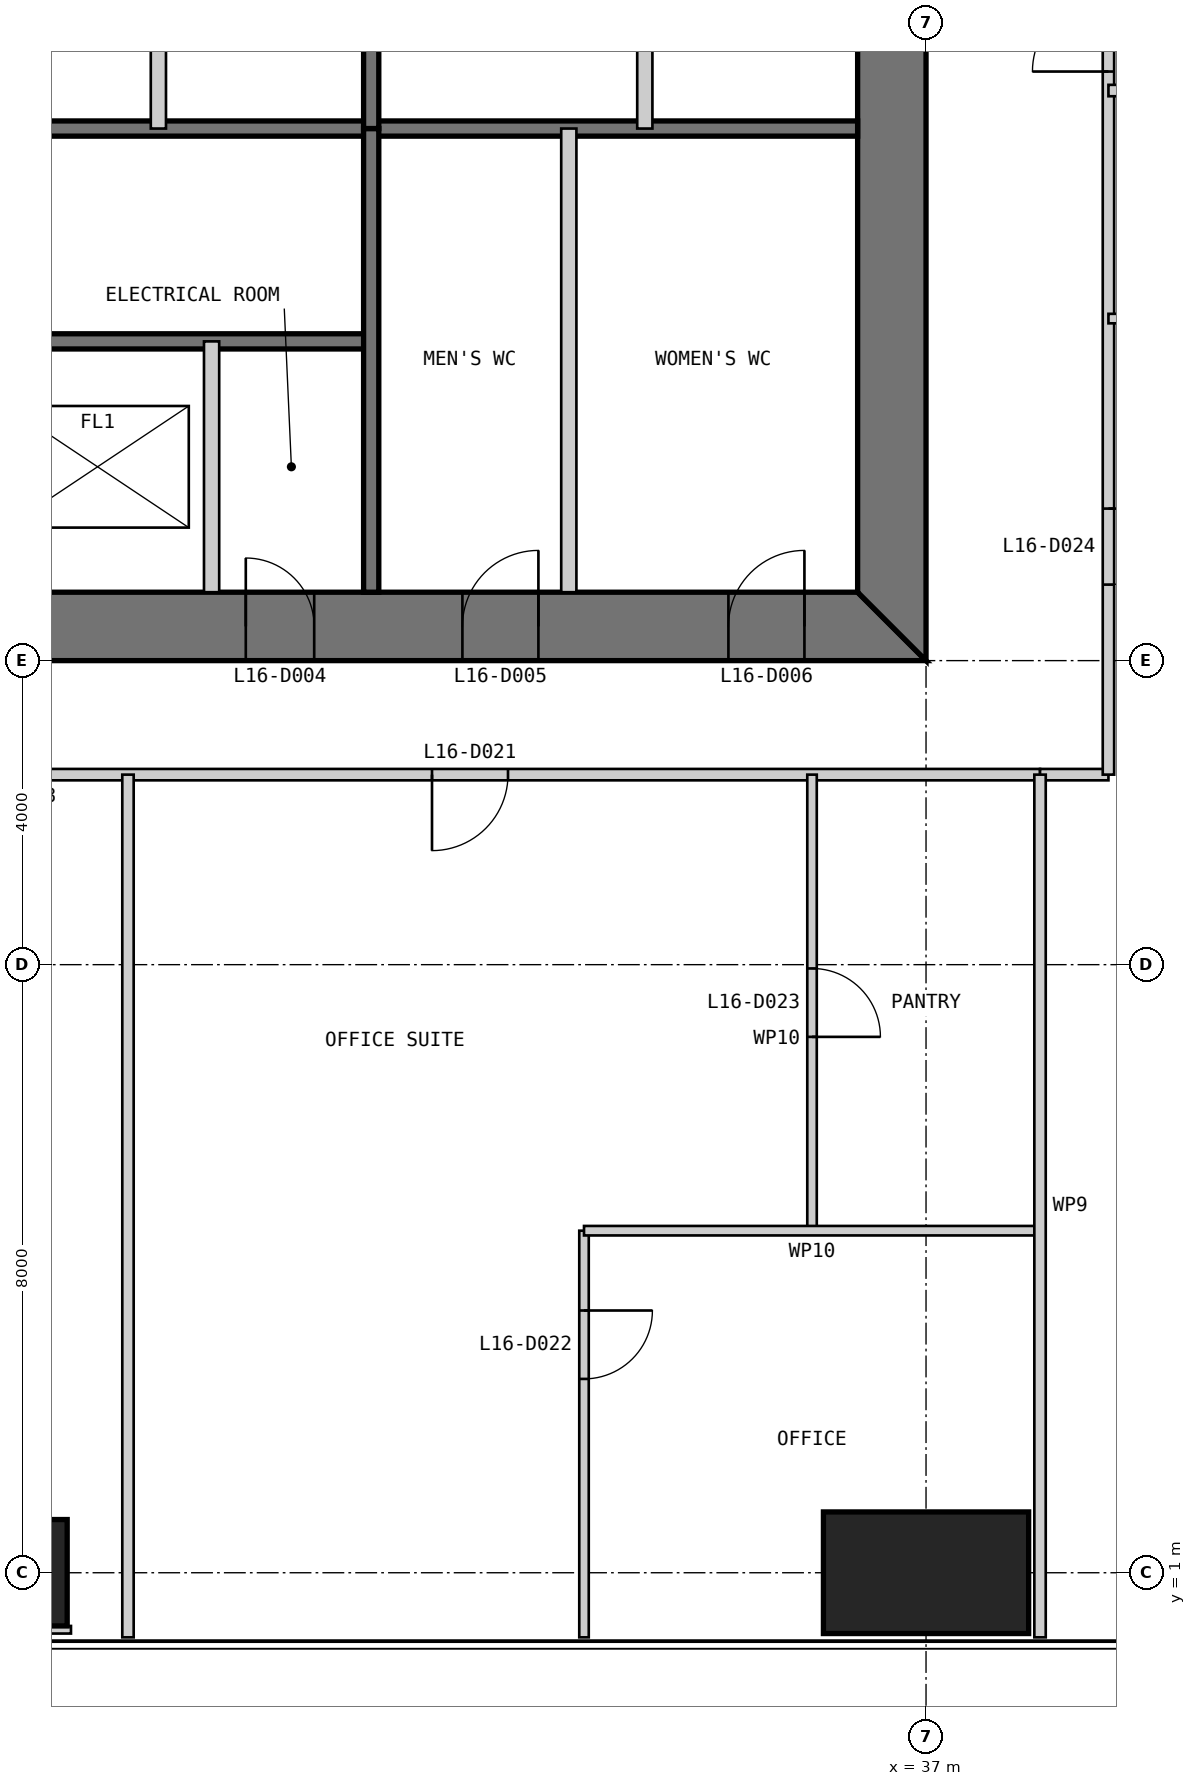
"""IFC4 building model, lengths in metres.
Left out: names, types, materials, properties, quantities, classifications, styles, units other than length and angle.
Written with IfcOpenShell. Run it as: python <this file> out.ifc"""

import sys

from ifc_helpers import new_model, si_unit, direction, frame, frame_2d, origin, origin_2d, place, context, subcontext, project, spatial, polyline, rectangle, outline, extrude, element, fill, save


model = new_model("IFC4")
c1 = context("Model", 3, precision=1e-05, world=origin(), true_north=direction((0.0, 1.0)))
c2 = subcontext(c1, "Body", "Model", "MODEL_VIEW")
j1 = project(units=[si_unit("LENGTHUNIT", "METRE"), si_unit("PLANEANGLEUNIT", "RADIAN")], contexts=[c1])
p1 = place(None, origin())
s1 = spatial("IfcSite", under=j1, at=p1, CompositionType="ELEMENT")
p2 = place(p1, origin())
s2 = spatial("IfcBuilding", under=s1, at=p2, CompositionType="ELEMENT")
p3 = place(p2, frame((0.0, 0.0, 71.0)))
s3 = spatial("IfcBuildingStorey", under=s2, at=p3, CompositionType="ELEMENT", Elevation=71.0)
p4 = place(p3, frame((25.0, 1.0, 0.0), z_axis=(0.0, 0.0, 1.0), x_axis=(1.0, 0.0, 0.0)))
e1 = element("IfcColumn", 1, at=p4, inside=s3, PredefinedType="COLUMN", context=c2, shape_type="SweptSolid", body=[
    extrude(rectangle(XDim=1.4, YDim=1.4, at=origin_2d()), origin(), (0.0, 0.0, 1.0), 4.0),
])
p5 = place(p3, frame((37.0, 1.0, 0.0), z_axis=(0.0, 0.0, 1.0), x_axis=(1.0, 0.0, 0.0)))
e2 = element("IfcColumn", 2, at=p5, inside=s3, PredefinedType="COLUMN", context=c2, shape_type="SweptSolid", body=[
    extrude(rectangle(XDim=2.7, YDim=1.6, at=origin_2d()), origin(), (0.0, 0.0, 1.0), 4.0),
])
p6 = place(p3, frame((13.0, 13.45, 0.0), z_axis=(0.0, 0.0, 1.0), x_axis=(1.0, 0.0, 0.0)))
e3 = element("IfcWall", 3, at=p6, inside=s3, PredefinedType="SHEAR", context=c2, shape_type="SweptSolid", body=[
    extrude(outline(polyline([(0.0, -0.45), (24.0, -0.45), (23.1, 0.45), (0.9, 0.45), (0.0, -0.45)])), origin(), (0.0, 0.0, 1.0), 4.0),
])
p7 = place(p6, frame((4.9, 0.0, 0.0)))
e4 = element("IfcOpeningElement", 4, at=p7, cuts=e3, PredefinedType="OPENING", context=c2, shape_type="SweptSolid", body=[
    extrude(rectangle(XDim=1.0, YDim=2.2, at=frame_2d((0.5, 1.1))), frame((0.0, 0.46, 0.0), z_axis=(0.0, -1.0, 0.0), x_axis=(1.0, 0.0, 0.0)), (0.0, 0.0, 1.0), 0.92),
])
p8 = place(p6, frame((8.9, 0.0, 0.0)))
e5 = element("IfcOpeningElement", 5, at=p8, cuts=e3, PredefinedType="OPENING", context=c2, shape_type="SweptSolid", body=[
    extrude(rectangle(XDim=1.1, YDim=2.2, at=frame_2d((0.55, 1.1))), frame((0.0, 0.46, 0.0), z_axis=(0.0, -1.0, 0.0), x_axis=(1.0, 0.0, 0.0)), (0.0, 0.0, 1.0), 0.92),
])
p9 = place(p6, frame((15.05, 0.0, 0.0)))
e6 = element("IfcOpeningElement", 6, at=p9, cuts=e3, PredefinedType="OPENING", context=c2, shape_type="SweptSolid", body=[
    extrude(rectangle(XDim=0.9, YDim=2.2, at=frame_2d((0.45, 1.1))), frame((0.0, 0.46, 0.0), z_axis=(0.0, -1.0, 0.0), x_axis=(1.0, 0.0, 0.0)), (0.0, 0.0, 1.0), 0.92),
])
p10 = place(p6, frame((17.9, 0.0, 0.0)))
e7 = element("IfcOpeningElement", 7, at=p10, cuts=e3, PredefinedType="OPENING", context=c2, shape_type="SweptSolid", body=[
    extrude(rectangle(XDim=1.0, YDim=2.2, at=frame_2d((0.5, 1.1))), frame((0.0, 0.46, 0.0), z_axis=(0.0, -1.0, 0.0), x_axis=(1.0, 0.0, 0.0)), (0.0, 0.0, 1.0), 0.92),
])
p11 = place(p6, frame((21.4, 0.0, 0.0)))
e8 = element("IfcOpeningElement", 8, at=p11, cuts=e3, PredefinedType="OPENING", context=c2, shape_type="SweptSolid", body=[
    extrude(rectangle(XDim=1.0, YDim=2.2, at=frame_2d((0.5, 1.1))), frame((0.0, 0.46, 0.0), z_axis=(0.0, -1.0, 0.0), x_axis=(1.0, 0.0, 0.0)), (0.0, 0.0, 1.0), 0.92),
])
p12 = place(p3, frame((36.55, 13.9, 0.0), z_axis=(0.0, 0.0, 1.0), x_axis=(0.0, 1.0, 0.0)))
e9 = element("IfcWall", 9, at=p12, inside=s3, PredefinedType="SHEAR", context=c2, shape_type="SweptSolid", body=[
    extrude(outline(polyline([(-0.9, -0.45), (23.1, -0.45), (22.2, 0.45), (0.0, 0.45), (-0.9, -0.45)])), origin(), (0.0, 0.0, 1.0), 4.0),
])
p13 = place(p12, frame((20.2, 0.0, 0.0)))
e10 = element("IfcOpeningElement", 10, at=p13, cuts=e9, PredefinedType="OPENING", context=c2, shape_type="SweptSolid", body=[
    extrude(rectangle(XDim=1.0, YDim=2.2, at=frame_2d((0.5, 1.1))), frame((0.0, 0.46, 0.0), z_axis=(0.0, -1.0, 0.0), x_axis=(1.0, 0.0, 0.0)), (0.0, 0.0, 1.0), 0.92),
])
p14 = place(p12, frame((17.25, 0.0, 0.0)))
e11 = element("IfcOpeningElement", 11, at=p14, cuts=e9, PredefinedType="OPENING", context=c2, shape_type="SweptSolid", body=[
    extrude(rectangle(XDim=0.9, YDim=2.2, at=frame_2d((0.45, 1.1))), frame((0.0, 0.46, 0.0), z_axis=(0.0, -1.0, 0.0), x_axis=(1.0, 0.0, 0.0)), (0.0, 0.0, 1.0), 0.92),
])
p15 = place(p3, frame((20.3, 17.2, 0.0), z_axis=(0.0, 0.0, 1.0), x_axis=(1.0, 0.0, 0.0)))
e12 = element("IfcWall", 12, at=p15, inside=s3, PredefinedType="SOLIDWALL", context=c2, shape_type="SweptSolid", body=[
    extrude(rectangle(XDim=9.4, YDim=0.2, at=frame_2d((4.7, 0.0))), origin(), (0.0, 0.0, 1.0), 3.8),
])
p16 = place(p15, frame((0.25, 0.0, 0.0)))
e13 = element("IfcOpeningElement", 13, at=p16, cuts=e12, PredefinedType="OPENING", context=c2, shape_type="SweptSolid", body=[
    extrude(rectangle(XDim=1.0, YDim=2.2, at=frame_2d((0.5, 1.1))), frame((0.0, 0.11, 0.0), z_axis=(0.0, -1.0, 0.0), x_axis=(1.0, 0.0, 0.0)), (0.0, 0.0, 1.0), 0.22),
])
p17 = place(p3, frame((20.3, 20.0, 0.0), z_axis=(0.0, 0.0, 1.0), x_axis=(1.0, 0.0, 0.0)))
e14 = element("IfcWall", 14, at=p17, inside=s3, PredefinedType="SOLIDWALL", context=c2, shape_type="SweptSolid", body=[
    extrude(rectangle(XDim=15.8, YDim=0.2, at=frame_2d((7.9, 0.0))), origin(), (0.0, 0.0, 1.0), 3.8),
])
p18 = place(p3, frame((27.6, 13.9, 0.0), z_axis=(0.0, 0.0, 1.0), x_axis=(0.0, 1.0, 0.0)))
e15 = element("IfcWall", 15, at=p18, inside=s3, PredefinedType="PARTITIONING", context=c2, shape_type="SweptSolid", body=[
    extrude(rectangle(XDim=3.3, YDim=0.2, at=frame_2d((1.65, 0.0))), origin(), (0.0, 0.0, 1.0), 3.8),
])
p19 = place(p3, frame((29.7, 13.9, 0.0), z_axis=(0.0, 0.0, 1.0), x_axis=(0.0, 1.0, 0.0)))
e16 = element("IfcWall", 16, at=p19, inside=s3, PredefinedType="SOLIDWALL", context=c2, shape_type="SweptSolid", body=[
    extrude(rectangle(XDim=6.1, YDim=0.2, at=frame_2d((3.05, 0.0))), origin(), (0.0, 0.0, 1.0), 3.8),
])
p20 = place(p3, frame((32.3, 13.9, 0.0), z_axis=(0.0, 0.0, 1.0), x_axis=(0.0, 1.0, 0.0)))
e17 = element("IfcWall", 17, at=p20, inside=s3, PredefinedType="PARTITIONING", context=c2, shape_type="SweptSolid", body=[
    extrude(rectangle(XDim=6.1, YDim=0.2, at=frame_2d((3.05, 0.0))), origin(), (0.0, 0.0, 1.0), 3.8),
])
p21 = place(p3, frame((33.3, 36.1, 0.0), z_axis=(0.0, 0.0, 1.0), x_axis=(0.0, -1.0, 0.0)))
e18 = element("IfcWall", 18, at=p21, inside=s3, PredefinedType="PARTITIONING", context=c2, shape_type="SweptSolid", body=[
    extrude(rectangle(XDim=16.1, YDim=0.2, at=frame_2d((8.05, 0.0))), origin(), (0.0, 0.0, 1.0), 3.8),
])
p22 = place(p21, frame((4.1, 0.0, 0.0)))
e19 = element("IfcOpeningElement", 19, at=p22, cuts=e18, PredefinedType="OPENING", context=c2, shape_type="SweptSolid", body=[
    extrude(rectangle(XDim=0.9, YDim=2.2, at=frame_2d((0.45, 1.1))), frame((0.0, 0.11, 0.0), z_axis=(0.0, -1.0, 0.0), x_axis=(1.0, 0.0, 0.0)), (0.0, 0.0, 1.0), 0.22),
])
p23 = place(p3, frame((29.7, 36.1, 0.0), z_axis=(0.0, 0.0, 1.0), x_axis=(0.0, -1.0, 0.0)))
e20 = element("IfcWall", 20, at=p23, inside=s3, PredefinedType="SOLIDWALL", context=c2, shape_type="SweptSolid", body=[
    extrude(rectangle(XDim=16.1, YDim=0.2, at=frame_2d((8.05, 0.0))), origin(), (0.0, 0.0, 1.0), 3.8),
])
p24 = place(p3, frame((26.9, 30.0, 0.0), z_axis=(0.0, 0.0, 1.0), x_axis=(0.0, -1.0, 0.0)))
e21 = element("IfcWall", 21, at=p24, inside=s3, PredefinedType="PARTITIONING", context=c2, shape_type="SweptSolid", body=[
    extrude(rectangle(XDim=10.0, YDim=0.2, at=frame_2d((5.0, 0.0))), origin(), (0.0, 0.0, 1.0), 3.8),
])
p25 = place(p3, frame((11.5, 11.5, 0.0), z_axis=(0.0, 0.0, 1.0), x_axis=(1.0, 0.0, 0.0)))
e22 = element("IfcWall", 22, at=p25, inside=s3, PredefinedType="PARTITIONING", context=c2, shape_type="SweptSolid", body=[
    extrude(rectangle(XDim=27.0, YDim=0.15, at=frame_2d((13.5, 0.0))), origin(), (0.0, 0.0, 1.0), 3.85),
])
p26 = place(p25, frame((1.0, 0.0, 0.0)))
e23 = element("IfcOpeningElement", 23, at=p26, cuts=e22, PredefinedType="OPENING", context=c2, shape_type="SweptSolid", body=[
    extrude(rectangle(XDim=1.0, YDim=2.2, at=frame_2d((0.5, 1.1))), frame((0.0, 0.085, 0.0), z_axis=(0.0, -1.0, 0.0), x_axis=(1.0, 0.0, 0.0)), (0.0, 0.0, 1.0), 0.17),
])
p27 = place(p25, frame((5.5, 0.0, 0.0)))
e24 = element("IfcOpeningElement", 24, at=p27, cuts=e22, PredefinedType="OPENING", context=c2, shape_type="SweptSolid", body=[
    extrude(rectangle(XDim=1.0, YDim=2.2, at=frame_2d((0.5, 1.1))), frame((0.0, 0.085, 0.0), z_axis=(0.0, -1.0, 0.0), x_axis=(1.0, 0.0, 0.0)), (0.0, 0.0, 1.0), 0.17),
])
p28 = place(p25, frame((11.5, 0.0, 0.0)))
e25 = element("IfcOpeningElement", 25, at=p28, cuts=e22, PredefinedType="OPENING", context=c2, shape_type="SweptSolid", body=[
    extrude(rectangle(XDim=1.0, YDim=2.2, at=frame_2d((0.5, 1.1))), frame((0.0, 0.085, 0.0), z_axis=(0.0, -1.0, 0.0), x_axis=(1.0, 0.0, 0.0)), (0.0, 0.0, 1.0), 0.17),
])
p29 = place(p25, frame((19.0, 0.0, 0.0)))
e26 = element("IfcOpeningElement", 26, at=p29, cuts=e22, PredefinedType="OPENING", context=c2, shape_type="SweptSolid", body=[
    extrude(rectangle(XDim=1.0, YDim=2.2, at=frame_2d((0.5, 1.1))), frame((0.0, 0.085, 0.0), z_axis=(0.0, -1.0, 0.0), x_axis=(1.0, 0.0, 0.0)), (0.0, 0.0, 1.0), 0.17),
])
p30 = place(p3, frame((26.5, 0.15, 0.0), z_axis=(0.0, 0.0, 1.0), x_axis=(0.0, 1.0, 0.0)))
e27 = element("IfcWall", 27, at=p30, inside=s3, PredefinedType="PARTITIONING", context=c2, shape_type="SweptSolid", body=[
    extrude(rectangle(XDim=11.35, YDim=0.15, at=frame_2d((5.675, 0.0))), origin(), (0.0, 0.0, 1.0), 3.85),
])
p31 = place(p3, frame((32.5, 0.15, 0.0), z_axis=(0.0, 0.0, 1.0), x_axis=(0.0, 1.0, 0.0)))
e28 = element("IfcWall", 28, at=p31, inside=s3, PredefinedType="PARTITIONING", context=c2, shape_type="SweptSolid", body=[
    extrude(rectangle(XDim=5.35, YDim=0.125, at=frame_2d((2.675, 0.0))), origin(), (0.0, 0.0, 1.0), 3.85),
])
p32 = place(p31, frame((3.4, 0.0, 0.0)))
e29 = element("IfcOpeningElement", 29, at=p32, cuts=e28, PredefinedType="OPENING", context=c2, shape_type="SweptSolid", body=[
    extrude(rectangle(XDim=0.9, YDim=2.2, at=frame_2d((0.45, 1.1))), frame((0.0, 0.073, 0.0), z_axis=(0.0, -1.0, 0.0), x_axis=(1.0, 0.0, 0.0)), (0.0, 0.0, 1.0), 0.145),
])
p33 = place(p3, frame((35.5, 5.5, 0.0), z_axis=(0.0, 0.0, 1.0), x_axis=(0.0, 1.0, 0.0)))
e30 = element("IfcWall", 30, at=p33, inside=s3, PredefinedType="PARTITIONING", context=c2, shape_type="SweptSolid", body=[
    extrude(rectangle(XDim=6.0, YDim=0.125, at=frame_2d((3.0, 0.0))), origin(), (0.0, 0.0, 1.0), 3.85),
])
p34 = place(p33, frame((2.55, 0.0, 0.0)))
e31 = element("IfcOpeningElement", 31, at=p34, cuts=e30, PredefinedType="OPENING", context=c2, shape_type="SweptSolid", body=[
    extrude(rectangle(XDim=0.9, YDim=2.2, at=frame_2d((0.45, 1.1))), frame((0.0, 0.073, 0.0), z_axis=(0.0, -1.0, 0.0), x_axis=(1.0, 0.0, 0.0)), (0.0, 0.0, 1.0), 0.145),
])
p35 = place(p3, frame((32.5, 5.5, 0.0), z_axis=(0.0, 0.0, 1.0), x_axis=(1.0, 0.0, 0.0)))
e32 = element("IfcWall", 32, at=p35, inside=s3, PredefinedType="PARTITIONING", context=c2, shape_type="SweptSolid", body=[
    extrude(rectangle(XDim=6.0, YDim=0.125, at=frame_2d((3.0, 0.0))), origin(), (0.0, 0.0, 1.0), 3.85),
])
p36 = place(p3, frame((38.5, 11.5, 0.0), z_axis=(0.0, 0.0, 1.0), x_axis=(1.0, 0.0, 0.0)))
e33 = element("IfcWall", 33, at=p36, inside=s3, PredefinedType="PARTITIONING", context=c2, shape_type="SweptSolid", body=[
    extrude(rectangle(XDim=0.9, YDim=0.15, at=frame_2d((0.45, 0.0))), origin(), (0.0, 0.0, 1.0), 3.85),
])
p37 = place(p3, frame((39.4, 11.5, 0.0), z_axis=(0.0, 0.0, 1.0), x_axis=(0.0, 1.0, 0.0)))
e34 = element("IfcWall", 34, at=p37, inside=s3, PredefinedType="PARTITIONING", context=c2, shape_type="SweptSolid", body=[
    extrude(rectangle(XDim=27.9, YDim=0.15, at=frame_2d((13.95, 0.0))), origin(), (0.0, 0.0, 1.0), 3.85),
])
p38 = place(p37, frame((2.5, 0.0, 0.0)))
e35 = element("IfcOpeningElement", 35, at=p38, cuts=e34, PredefinedType="OPENING", context=c2, shape_type="SweptSolid", body=[
    extrude(rectangle(XDim=1.0, YDim=2.2, at=frame_2d((0.5, 1.1))), frame((0.0, 0.085, 0.0), z_axis=(0.0, -1.0, 0.0), x_axis=(1.0, 0.0, 0.0)), (0.0, 0.0, 1.0), 0.17),
])
p39 = place(p37, frame((9.25, 0.0, 0.0)))
e36 = element("IfcOpeningElement", 36, at=p39, cuts=e34, PredefinedType="OPENING", context=c2, shape_type="SweptSolid", body=[
    extrude(rectangle(XDim=1.0, YDim=2.2, at=frame_2d((0.5, 1.1))), frame((0.0, 0.085, 0.0), z_axis=(0.0, -1.0, 0.0), x_axis=(1.0, 0.0, 0.0)), (0.0, 0.0, 1.0), 0.17),
])
p40 = place(p37, frame((16.75, 0.0, 0.0)))
e37 = element("IfcOpeningElement", 37, at=p40, cuts=e34, PredefinedType="OPENING", context=c2, shape_type="SweptSolid", body=[
    extrude(rectangle(XDim=1.0, YDim=2.2, at=frame_2d((0.5, 1.1))), frame((0.0, 0.085, 0.0), z_axis=(0.0, -1.0, 0.0), x_axis=(1.0, 0.0, 0.0)), (0.0, 0.0, 1.0), 0.17),
])
p41 = place(p37, frame((23.5, 0.0, 0.0)))
e38 = element("IfcOpeningElement", 38, at=p41, cuts=e34, PredefinedType="OPENING", context=c2, shape_type="SweptSolid", body=[
    extrude(rectangle(XDim=1.0, YDim=2.2, at=frame_2d((0.5, 1.1))), frame((0.0, 0.085, 0.0), z_axis=(0.0, -1.0, 0.0), x_axis=(1.0, 0.0, 0.0)), (0.0, 0.0, 1.0), 0.17),
])
p42 = place(p3, frame((38.5, 0.15, 0.0), z_axis=(0.0, 0.0, 1.0), x_axis=(0.0, 1.0, 0.0)))
e39 = element("IfcWall", 39, at=p42, inside=s3, PredefinedType="PARTITIONING", context=c2, shape_type="SweptSolid", body=[
    extrude(rectangle(XDim=11.35, YDim=0.15, at=frame_2d((5.675, 0.0))), origin(), (0.0, 0.0, 1.0), 3.85),
])
p43 = place(p3, frame((44.5, 17.5, 0.0), z_axis=(0.0, 0.0, 1.0), x_axis=(-1.0, 0.0, 0.0)))
e40 = element("IfcWall", 40, at=p43, inside=s3, PredefinedType="PARTITIONING", context=c2, shape_type="SweptSolid", body=[
    extrude(rectangle(XDim=5.1, YDim=0.125, at=frame_2d((2.55, 0.0))), origin(), (0.0, 0.0, 1.0), 3.85),
])
p44 = place(p43, frame((2.1, 0.0, 0.0)))
e41 = element("IfcOpeningElement", 41, at=p44, cuts=e40, PredefinedType="OPENING", context=c2, shape_type="SweptSolid", body=[
    extrude(rectangle(XDim=0.9, YDim=2.2, at=frame_2d((0.45, 1.1))), frame((0.0, 0.073, 0.0), z_axis=(0.0, -1.0, 0.0), x_axis=(1.0, 0.0, 0.0)), (0.0, 0.0, 1.0), 0.145),
])
p45 = place(p3, frame((49.85, 20.5, 0.0), z_axis=(0.0, 0.0, 1.0), x_axis=(-1.0, 0.0, 0.0)))
e42 = element("IfcWall", 42, at=p45, inside=s3, PredefinedType="PARTITIONING", context=c2, shape_type="SweptSolid", body=[
    extrude(rectangle(XDim=10.45, YDim=0.15, at=frame_2d((5.225, 0.0))), origin(), (0.0, 0.0, 1.0), 3.85),
])
p46 = place(p3, frame((25.0, 0.2, 0.0), z_axis=(0.0, 0.0, 1.0), x_axis=(0.0, 1.0, 0.0)))
e43 = element("IfcWall", 43, at=p46, inside=s3, PredefinedType="PARTITIONING", context=c2, shape_type="SweptSolid", body=[
    extrude(rectangle(XDim=0.1, YDim=1.5, at=frame_2d((0.05, 0.0))), origin(), (0.0, 0.0, 1.0), 3.85),
])
p47 = place(p9, origin())
e44 = element("IfcDoor", 44, at=p47, inside=s3, OperationType="SINGLE_SWING_LEFT", PredefinedType="DOOR", context=c2, shape_type="SweptSolid", body=[
    extrude(rectangle(XDim=0.9, YDim=2.2, at=frame_2d((0.45, 1.1))), frame((0.0, 0.025, 0.0), z_axis=(0.0, -1.0, 0.0), x_axis=(1.0, 0.0, 0.0)), (0.0, 0.0, 1.0), 0.05),
    extrude(outline(polyline([(0.0, 0.0), (0.04, 0.0), (0.04, 2.16), (0.86, 2.16), (0.86, 0.0), (0.9, 0.0), (0.9, 2.2), (0.0, 2.2), (0.0, 0.0)])), frame((0.0, 0.3, 0.0), z_axis=(0.0, -1.0, 0.0), x_axis=(1.0, 0.0, 0.0)), (0.0, 0.0, 1.0), 0.6),
])
fill(e6, e44)
p48 = place(p10, origin())
e45 = element("IfcDoor", 45, at=p48, inside=s3, OperationType="SINGLE_SWING_RIGHT", PredefinedType="DOOR", context=c2, shape_type="SweptSolid", body=[
    extrude(rectangle(XDim=1.0, YDim=2.2, at=frame_2d((0.5, 1.1))), frame((0.0, 0.025, 0.0), z_axis=(0.0, -1.0, 0.0), x_axis=(1.0, 0.0, 0.0)), (0.0, 0.0, 1.0), 0.05),
    extrude(outline(polyline([(0.0, 0.0), (0.04, 0.0), (0.04, 2.16), (0.96, 2.16), (0.96, 0.0), (1.0, 0.0), (1.0, 2.2), (0.0, 2.2), (0.0, 0.0)])), frame((0.0, 0.3, 0.0), z_axis=(0.0, -1.0, 0.0), x_axis=(1.0, 0.0, 0.0)), (0.0, 0.0, 1.0), 0.6),
])
fill(e7, e45)
p49 = place(p11, origin())
e46 = element("IfcDoor", 46, at=p49, inside=s3, OperationType="SINGLE_SWING_RIGHT", PredefinedType="DOOR", context=c2, shape_type="SweptSolid", body=[
    extrude(rectangle(XDim=1.0, YDim=2.2, at=frame_2d((0.5, 1.1))), frame((0.0, 0.025, 0.0), z_axis=(0.0, -1.0, 0.0), x_axis=(1.0, 0.0, 0.0)), (0.0, 0.0, 1.0), 0.05),
    extrude(outline(polyline([(0.0, 0.0), (0.04, 0.0), (0.04, 2.16), (0.96, 2.16), (0.96, 0.0), (1.0, 0.0), (1.0, 2.2), (0.0, 2.2), (0.0, 0.0)])), frame((0.0, 0.3, 0.0), z_axis=(0.0, -1.0, 0.0), x_axis=(1.0, 0.0, 0.0)), (0.0, 0.0, 1.0), 0.6),
])
fill(e8, e46)
p50 = place(p29, frame((1.0, 0.0, 0.0), z_axis=(0.0, 0.0, 1.0), x_axis=(-1.0, 0.0, 0.0)))
e47 = element("IfcDoor", 47, at=p50, inside=s3, OperationType="SINGLE_SWING_RIGHT", PredefinedType="DOOR", context=c2, shape_type="SweptSolid", body=[
    extrude(rectangle(XDim=1.0, YDim=2.2, at=frame_2d((0.5, 1.1))), frame((0.0, 0.025, 0.0), z_axis=(0.0, -1.0, 0.0), x_axis=(1.0, 0.0, 0.0)), (0.0, 0.0, 1.0), 0.05),
])
fill(e26, e47)
p51 = place(p32, frame((0.9, 0.0, 0.0), z_axis=(0.0, 0.0, 1.0), x_axis=(-1.0, 0.0, 0.0)))
e48 = element("IfcDoor", 48, at=p51, inside=s3, OperationType="SINGLE_SWING_LEFT", PredefinedType="DOOR", context=c2, shape_type="SweptSolid", body=[
    extrude(rectangle(XDim=0.9, YDim=2.2, at=frame_2d((0.45, 1.1))), frame((0.0, 0.025, 0.0), z_axis=(0.0, -1.0, 0.0), x_axis=(1.0, 0.0, 0.0)), (0.0, 0.0, 1.0), 0.05),
])
fill(e29, e48)
p52 = place(p34, frame((0.9, 0.0, 0.0), z_axis=(0.0, 0.0, 1.0), x_axis=(-1.0, 0.0, 0.0)))
e49 = element("IfcDoor", 49, at=p52, inside=s3, OperationType="SINGLE_SWING_RIGHT", PredefinedType="DOOR", context=c2, shape_type="SweptSolid", body=[
    extrude(rectangle(XDim=0.9, YDim=2.2, at=frame_2d((0.45, 1.1))), frame((0.0, 0.025, 0.0), z_axis=(0.0, -1.0, 0.0), x_axis=(1.0, 0.0, 0.0)), (0.0, 0.0, 1.0), 0.05),
])
fill(e31, e49)
p53 = place(p38, frame((1.0, 0.0, 0.0), z_axis=(0.0, 0.0, 1.0), x_axis=(-1.0, 0.0, 0.0)))
e50 = element("IfcDoor", 50, at=p53, inside=s3, OperationType="SINGLE_SWING_LEFT", PredefinedType="DOOR", context=c2, shape_type="SweptSolid", body=[
    extrude(rectangle(XDim=1.0, YDim=2.2, at=frame_2d((0.5, 1.1))), frame((0.0, 0.025, 0.0), z_axis=(0.0, -1.0, 0.0), x_axis=(1.0, 0.0, 0.0)), (0.0, 0.0, 1.0), 0.05),
])
fill(e35, e50)
p54 = place(p39, origin())
e51 = element("IfcDoor", 51, at=p54, inside=s3, OperationType="SINGLE_SWING_LEFT", PredefinedType="DOOR", context=c2, shape_type="SweptSolid", body=[
    extrude(rectangle(XDim=1.0, YDim=2.2, at=frame_2d((0.5, 1.1))), frame((0.0, 0.025, 0.0), z_axis=(0.0, -1.0, 0.0), x_axis=(1.0, 0.0, 0.0)), (0.0, 0.0, 1.0), 0.05),
])
fill(e36, e51)
save(model, sys.argv[1])
